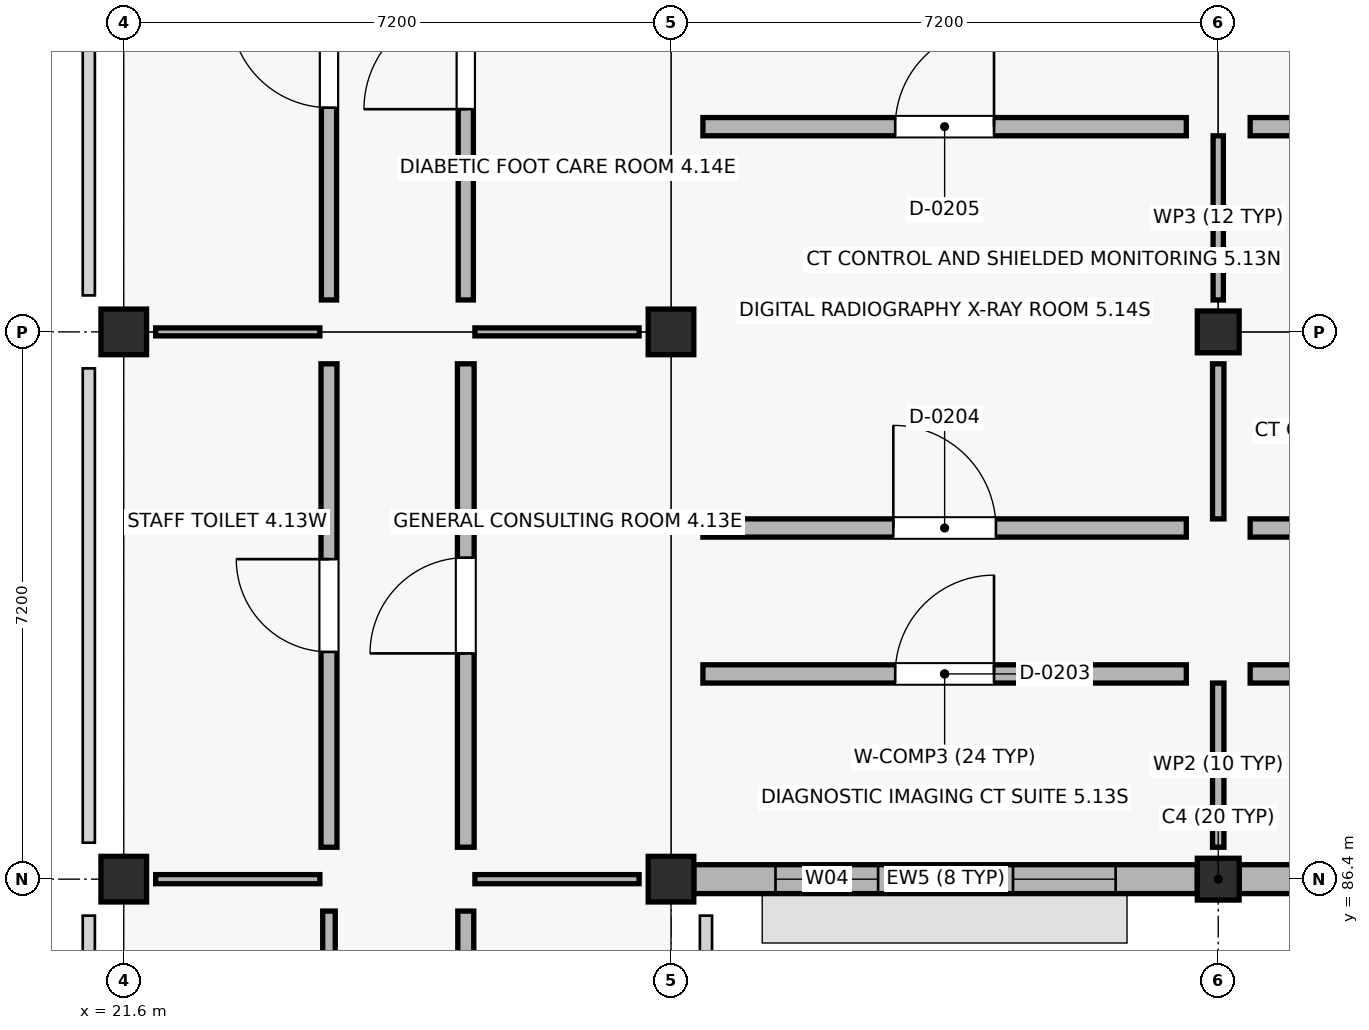
"""IFC4 building model, lengths in metres.
Left out: names, types, materials, properties, quantities, classifications, styles, units other than length and angle.
Written with IfcOpenShell. Run it as: python <this file> out.ifc"""

import sys

from ifc_helpers import new_model, si_unit, direction, frame, frame_2d, origin, origin_2d, place, context, subcontext, project, spatial, rectangle, extrude, element, fill, save


model = new_model("IFC4")
c1 = context("Model", 3, precision=1e-05, world=origin(), true_north=direction((0.0, 1.0)))
c2 = subcontext(c1, "Body", "Model", "MODEL_VIEW")
j1 = project(units=[si_unit("LENGTHUNIT", "METRE"), si_unit("PLANEANGLEUNIT", "RADIAN")], contexts=[c1])
p1 = place(None, origin())
s1 = spatial("IfcSite", under=j1, at=p1, CompositionType="ELEMENT")
p2 = place(p1, origin())
s2 = spatial("IfcBuilding", under=s1, at=p2, CompositionType="ELEMENT")
p3 = place(p2, frame((0.0, 0.0, 4.5)))
s3 = spatial("IfcBuildingStorey", under=s2, at=p3, CompositionType="ELEMENT", Elevation=4.5)
for number, where, z_axis, x_axis in (
    (1, (21.6, 86.4, 0.0), (0.0, 0.0, 1.0), (1.0, 0.0, 0.0)),
    (2, (21.6, 93.6, 0.0), (0.0, 0.0, 1.0), (1.0, 0.0, 0.0)),
    (3, (28.8, 86.4, 0.0), (0.0, 0.0, 1.0), (1.0, 0.0, 0.0)),
    (4, (28.8, 93.6, 0.0), (0.0, 0.0, 1.0), (1.0, 0.0, 0.0)),
):
    element("IfcColumn", number, at=place(p3, frame(where, z_axis=z_axis, x_axis=x_axis)), inside=s3, PredefinedType="COLUMN", context=c2, shape_type="SweptSolid", body=[
        extrude(rectangle(XDim=0.6, YDim=0.6, at=origin_2d()), origin(), (0.0, 0.0, 1.0), 4.5),
    ])
for number, where, z_axis, x_axis in (
    (5, (36.0, 86.4, 0.0), (0.0, 0.0, 1.0), (1.0, 0.0, 0.0)),
    (6, (36.0, 93.6, 0.0), (0.0, 0.0, 1.0), (1.0, 0.0, 0.0)),
):
    element("IfcColumn", number, at=place(p3, frame(where, z_axis=z_axis, x_axis=x_axis)), inside=s3, PredefinedType="COLUMN", context=c2, shape_type="SweptSolid", body=[
        extrude(rectangle(XDim=0.55, YDim=0.55, at=origin_2d()), origin(), (0.0, 0.0, 1.0), 4.5),
    ])
p4 = place(p3, frame((29.1, 86.4, 0.0), z_axis=(0.0, 0.0, 1.0), x_axis=(1.0, 0.0, 0.0)))
e7 = element("IfcWall", 7, at=p4, inside=s3, PredefinedType="SOLIDWALL", context=c2, shape_type="SweptSolid", body=[
    extrude(rectangle(XDim=6.625, YDim=0.38, at=frame_2d((3.312, 0.0))), origin(), (0.0, 0.0, 1.0), 3.47),
])
p5 = place(p4, frame((1.075, 0.0, 0.9)))
e8 = element("IfcOpeningElement", 8, at=p5, cuts=e7, PredefinedType="OPENING", context=c2, shape_type="SweptSolid", body=[
    extrude(rectangle(XDim=1.35, YDim=1.25, at=frame_2d((0.675, 0.625))), frame((0.0, 0.2, 0.0), z_axis=(0.0, -1.0, 0.0), x_axis=(1.0, 0.0, 0.0)), (0.0, 0.0, 1.0), 0.4),
])
p6 = place(p4, frame((4.2, 0.0, 0.9)))
e9 = element("IfcOpeningElement", 9, at=p6, cuts=e7, PredefinedType="OPENING", context=c2, shape_type="SweptSolid", body=[
    extrude(rectangle(XDim=1.35, YDim=1.25, at=frame_2d((0.675, 0.625))), frame((0.0, 0.2, 0.0), z_axis=(0.0, -1.0, 0.0), x_axis=(1.0, 0.0, 0.0)), (0.0, 0.0, 1.0), 0.4),
])
p7 = place(p3, frame((36.275, 86.4, 0.0), z_axis=(0.0, 0.0, 1.0), x_axis=(1.0, 0.0, 0.0)))
e10 = element("IfcWall", 10, at=p7, inside=s3, PredefinedType="SOLIDWALL", context=c2, shape_type="SweptSolid", body=[
    extrude(rectangle(XDim=6.65, YDim=0.38, at=frame_2d((3.325, 0.0))), origin(), (0.0, 0.0, 1.0), 3.47),
])
p8 = place(p7, frame((0.675, 0.0, 0.9)))
e11 = element("IfcOpeningElement", 11, at=p8, cuts=e10, PredefinedType="OPENING", context=c2, shape_type="SweptSolid", body=[
    extrude(rectangle(XDim=2.15, YDim=1.25, at=frame_2d((1.075, 0.625))), frame((0.0, 0.2, 0.0), z_axis=(0.0, -1.0, 0.0), x_axis=(1.0, 0.0, 0.0)), (0.0, 0.0, 1.0), 0.4),
])
p9 = place(p7, frame((3.825, 0.0, 0.9)))
e12 = element("IfcOpeningElement", 12, at=p9, cuts=e10, PredefinedType="OPENING", context=c2, shape_type="SweptSolid", body=[
    extrude(rectangle(XDim=2.15, YDim=1.25, at=frame_2d((1.075, 0.625))), frame((0.0, 0.2, 0.0), z_axis=(0.0, -1.0, 0.0), x_axis=(1.0, 0.0, 0.0)), (0.0, 0.0, 1.0), 0.4),
])
p10 = place(p3, frame((29.22, 89.1, 0.0), z_axis=(0.0, 0.0, 1.0), x_axis=(1.0, 0.0, 0.0)))
e13 = element("IfcWall", 13, at=p10, inside=s3, PredefinedType="SOLIDWALL", context=c2, shape_type="SweptSolid", body=[
    extrude(rectangle(XDim=6.36, YDim=0.24, at=frame_2d((3.18, 0.0))), origin(), (0.0, 0.0, 1.0), 3.36),
])
p11 = place(p10, frame((2.53, 0.0, 0.0)))
e14 = element("IfcOpeningElement", 14, at=p11, cuts=e13, PredefinedType="OPENING", context=c2, shape_type="SweptSolid", body=[
    extrude(rectangle(XDim=1.3, YDim=2.15, at=frame_2d((0.65, 1.075))), frame((0.0, 0.13, 0.0), z_axis=(0.0, -1.0, 0.0), x_axis=(1.0, 0.0, 0.0)), (0.0, 0.0, 1.0), 0.26),
])
p12 = place(p3, frame((36.0, 86.82, 0.0), z_axis=(0.0, 0.0, 1.0), x_axis=(0.0, 1.0, 0.0)))
e15 = element("IfcWall", 15, at=p12, inside=s3, PredefinedType="PARTITIONING", context=c2, shape_type="SweptSolid", body=[
    extrude(rectangle(XDim=2.16, YDim=0.15, at=frame_2d((1.08, 0.0))), origin(), (0.0, 0.0, 1.0), 3.36),
])
p13 = place(p3, frame((29.22, 91.02, 0.0), z_axis=(0.0, 0.0, 1.0), x_axis=(1.0, 0.0, 0.0)))
e16 = element("IfcWall", 16, at=p13, inside=s3, PredefinedType="SOLIDWALL", context=c2, shape_type="SweptSolid", body=[
    extrude(rectangle(XDim=6.36, YDim=0.24, at=frame_2d((3.18, 0.0))), origin(), (0.0, 0.0, 1.0), 3.36),
])
p14 = place(p13, frame((2.505, 0.0, 0.0)))
e17 = element("IfcOpeningElement", 17, at=p14, cuts=e16, PredefinedType="OPENING", context=c2, shape_type="SweptSolid", body=[
    extrude(rectangle(XDim=1.35, YDim=2.2, at=frame_2d((0.675, 1.1))), frame((0.0, 0.13, 0.0), z_axis=(0.0, -1.0, 0.0), x_axis=(1.0, 0.0, 0.0)), (0.0, 0.0, 1.0), 0.26),
])
p15 = place(p3, frame((36.0, 91.14, 0.0), z_axis=(0.0, 0.0, 1.0), x_axis=(0.0, 1.0, 0.0)))
e18 = element("IfcWall", 18, at=p15, inside=s3, PredefinedType="PARTITIONING", context=c2, shape_type="SweptSolid", body=[
    extrude(rectangle(XDim=2.04, YDim=0.15, at=frame_2d((1.02, 0.0))), origin(), (0.0, 0.0, 1.0), 3.36),
])
p16 = place(p3, frame((29.22, 96.3, 0.0), z_axis=(0.0, 0.0, 1.0), x_axis=(1.0, 0.0, 0.0)))
e19 = element("IfcWall", 19, at=p16, inside=s3, PredefinedType="SOLIDWALL", context=c2, shape_type="SweptSolid", body=[
    extrude(rectangle(XDim=6.36, YDim=0.24, at=frame_2d((3.18, 0.0))), origin(), (0.0, 0.0, 1.0), 3.36),
])
p17 = place(p16, frame((2.53, 0.0, 0.0)))
e20 = element("IfcOpeningElement", 20, at=p17, cuts=e19, PredefinedType="OPENING", context=c2, shape_type="SweptSolid", body=[
    extrude(rectangle(XDim=1.3, YDim=2.15, at=frame_2d((0.65, 1.075))), frame((0.0, 0.13, 0.0), z_axis=(0.0, -1.0, 0.0), x_axis=(1.0, 0.0, 0.0)), (0.0, 0.0, 1.0), 0.26),
])
p18 = place(p3, frame((36.0, 94.02, 0.0), z_axis=(0.0, 0.0, 1.0), x_axis=(0.0, 1.0, 0.0)))
e21 = element("IfcWall", 21, at=p18, inside=s3, PredefinedType="PARTITIONING", context=c2, shape_type="SweptSolid", body=[
    extrude(rectangle(XDim=2.16, YDim=0.135, at=frame_2d((1.08, 0.0))), origin(), (0.0, 0.0, 1.0), 3.36),
])
p19 = place(p3, frame((36.42, 89.1, 0.0), z_axis=(0.0, 0.0, 1.0), x_axis=(1.0, 0.0, 0.0)))
e22 = element("IfcWall", 22, at=p19, inside=s3, PredefinedType="SOLIDWALL", context=c2, shape_type="SweptSolid", body=[
    extrude(rectangle(XDim=6.36, YDim=0.24, at=frame_2d((3.18, 0.0))), origin(), (0.0, 0.0, 1.0), 3.36),
])
p20 = place(p19, frame((2.53, 0.0, 0.0)))
e23 = element("IfcOpeningElement", 23, at=p20, cuts=e22, PredefinedType="OPENING", context=c2, shape_type="SweptSolid", body=[
    extrude(rectangle(XDim=1.3, YDim=2.15, at=frame_2d((0.65, 1.075))), frame((0.0, 0.13, 0.0), z_axis=(0.0, -1.0, 0.0), x_axis=(1.0, 0.0, 0.0)), (0.0, 0.0, 1.0), 0.26),
])
p21 = place(p3, frame((36.42, 91.02, 0.0), z_axis=(0.0, 0.0, 1.0), x_axis=(1.0, 0.0, 0.0)))
e24 = element("IfcWall", 24, at=p21, inside=s3, PredefinedType="SOLIDWALL", context=c2, shape_type="SweptSolid", body=[
    extrude(rectangle(XDim=6.36, YDim=0.24, at=frame_2d((3.18, 0.0))), origin(), (0.0, 0.0, 1.0), 3.36),
])
p22 = place(p21, frame((2.505, 0.0, 0.0)))
e25 = element("IfcOpeningElement", 25, at=p22, cuts=e24, PredefinedType="OPENING", context=c2, shape_type="SweptSolid", body=[
    extrude(rectangle(XDim=1.35, YDim=2.2, at=frame_2d((0.675, 1.1))), frame((0.0, 0.13, 0.0), z_axis=(0.0, -1.0, 0.0), x_axis=(1.0, 0.0, 0.0)), (0.0, 0.0, 1.0), 0.26),
])
p23 = place(p3, frame((36.42, 96.3, 0.0), z_axis=(0.0, 0.0, 1.0), x_axis=(1.0, 0.0, 0.0)))
e26 = element("IfcWall", 26, at=p23, inside=s3, PredefinedType="SOLIDWALL", context=c2, shape_type="SweptSolid", body=[
    extrude(rectangle(XDim=6.36, YDim=0.24, at=frame_2d((3.18, 0.0))), origin(), (0.0, 0.0, 1.0), 3.36),
])
p24 = place(p23, frame((2.53, 0.0, 0.0)))
e27 = element("IfcOpeningElement", 27, at=p24, cuts=e26, PredefinedType="OPENING", context=c2, shape_type="SweptSolid", body=[
    extrude(rectangle(XDim=1.3, YDim=2.15, at=frame_2d((0.65, 1.075))), frame((0.0, 0.13, 0.0), z_axis=(0.0, -1.0, 0.0), x_axis=(1.0, 0.0, 0.0)), (0.0, 0.0, 1.0), 0.26),
])
p25 = place(p3, frame((24.3, 79.62, 0.0), z_axis=(0.0, 0.0, 1.0), x_axis=(0.0, 1.0, 0.0)))
e28 = element("IfcWall", 28, at=p25, inside=s3, PredefinedType="PARTITIONING", context=c2, shape_type="SweptSolid", body=[
    extrude(rectangle(XDim=6.36, YDim=0.165, at=frame_2d((3.18, 0.0))), origin(), (0.0, 0.0, 1.0), 3.36),
])
p26 = place(p25, frame((2.61, 0.0, 0.0)))
e29 = element("IfcOpeningElement", 29, at=p26, cuts=e28, PredefinedType="OPENING", context=c2, shape_type="SweptSolid", body=[
    extrude(rectangle(XDim=1.14, YDim=2.04, at=frame_2d((0.57, 1.02))), frame((0.0, 0.093, 0.0), z_axis=(0.0, -1.0, 0.0), x_axis=(1.0, 0.0, 0.0)), (0.0, 0.0, 1.0), 0.185),
])
p27 = place(p3, frame((22.02, 86.4, 0.0), z_axis=(0.0, 0.0, 1.0), x_axis=(1.0, 0.0, 0.0)))
e30 = element("IfcWall", 30, at=p27, inside=s3, PredefinedType="PARTITIONING", context=c2, shape_type="SweptSolid", body=[
    extrude(rectangle(XDim=2.16, YDim=0.12, at=frame_2d((1.08, 0.0))), origin(), (0.0, 0.0, 1.0), 3.36),
])
p28 = place(p3, frame((26.1, 79.62, 0.0), z_axis=(0.0, 0.0, 1.0), x_axis=(0.0, 1.0, 0.0)))
e31 = element("IfcWall", 31, at=p28, inside=s3, PredefinedType="PLUMBINGWALL", context=c2, shape_type="SweptSolid", body=[
    extrude(rectangle(XDim=6.36, YDim=0.21, at=frame_2d((3.18, 0.0))), origin(), (0.0, 0.0, 1.0), 3.36),
])
p29 = place(p28, frame((2.59, 0.0, 0.0)))
e32 = element("IfcOpeningElement", 32, at=p29, cuts=e31, PredefinedType="OPENING", context=c2, shape_type="SweptSolid", body=[
    extrude(rectangle(XDim=1.18, YDim=2.04, at=frame_2d((0.59, 1.02))), frame((0.0, 0.115, 0.0), z_axis=(0.0, -1.0, 0.0), x_axis=(1.0, 0.0, 0.0)), (0.0, 0.0, 1.0), 0.23),
])
p30 = place(p3, frame((26.22, 86.4, 0.0), z_axis=(0.0, 0.0, 1.0), x_axis=(1.0, 0.0, 0.0)))
e33 = element("IfcWall", 33, at=p30, inside=s3, PredefinedType="PARTITIONING", context=c2, shape_type="SweptSolid", body=[
    extrude(rectangle(XDim=2.16, YDim=0.12, at=frame_2d((1.08, 0.0))), origin(), (0.0, 0.0, 1.0), 3.36),
])
p31 = place(p3, frame((24.3, 86.82, 0.0), z_axis=(0.0, 0.0, 1.0), x_axis=(0.0, 1.0, 0.0)))
e34 = element("IfcWall", 34, at=p31, inside=s3, PredefinedType="PLUMBINGWALL", context=c2, shape_type="SweptSolid", body=[
    extrude(rectangle(XDim=6.36, YDim=0.21, at=frame_2d((3.18, 0.0))), origin(), (0.0, 0.0, 1.0), 3.36),
])
p32 = place(p31, frame((2.57, 0.0, 0.0)))
e35 = element("IfcOpeningElement", 35, at=p32, cuts=e34, PredefinedType="OPENING", context=c2, shape_type="SweptSolid", body=[
    extrude(rectangle(XDim=1.22, YDim=2.04, at=frame_2d((0.61, 1.02))), frame((0.0, 0.115, 0.0), z_axis=(0.0, -1.0, 0.0), x_axis=(1.0, 0.0, 0.0)), (0.0, 0.0, 1.0), 0.23),
])
p33 = place(p3, frame((22.02, 93.6, 0.0), z_axis=(0.0, 0.0, 1.0), x_axis=(1.0, 0.0, 0.0)))
e36 = element("IfcWall", 36, at=p33, inside=s3, PredefinedType="PARTITIONING", context=c2, shape_type="SweptSolid", body=[
    extrude(rectangle(XDim=2.16, YDim=0.105, at=frame_2d((1.08, 0.0))), origin(), (0.0, 0.0, 1.0), 3.36),
])
p34 = place(p3, frame((26.1, 86.82, 0.0), z_axis=(0.0, 0.0, 1.0), x_axis=(0.0, 1.0, 0.0)))
e37 = element("IfcWall", 37, at=p34, inside=s3, PredefinedType="SOLIDWALL", context=c2, shape_type="SweptSolid", body=[
    extrude(rectangle(XDim=6.36, YDim=0.22, at=frame_2d((3.18, 0.0))), origin(), (0.0, 0.0, 1.0), 3.36),
])
p35 = place(p34, frame((2.55, 0.0, 0.0)))
e38 = element("IfcOpeningElement", 38, at=p35, cuts=e37, PredefinedType="OPENING", context=c2, shape_type="SweptSolid", body=[
    extrude(rectangle(XDim=1.26, YDim=2.04, at=frame_2d((0.63, 1.02))), frame((0.0, 0.12, 0.0), z_axis=(0.0, -1.0, 0.0), x_axis=(1.0, 0.0, 0.0)), (0.0, 0.0, 1.0), 0.24),
])
p36 = place(p3, frame((26.22, 93.6, 0.0), z_axis=(0.0, 0.0, 1.0), x_axis=(1.0, 0.0, 0.0)))
e39 = element("IfcWall", 39, at=p36, inside=s3, PredefinedType="PARTITIONING", context=c2, shape_type="SweptSolid", body=[
    extrude(rectangle(XDim=2.16, YDim=0.105, at=frame_2d((1.08, 0.0))), origin(), (0.0, 0.0, 1.0), 3.36),
])
p37 = place(p3, frame((24.3, 94.02, 0.0), z_axis=(0.0, 0.0, 1.0), x_axis=(0.0, 1.0, 0.0)))
e40 = element("IfcWall", 40, at=p37, inside=s3, PredefinedType="SOLIDWALL", context=c2, shape_type="SweptSolid", body=[
    extrude(rectangle(XDim=6.36, YDim=0.2, at=frame_2d((3.18, 0.0))), origin(), (0.0, 0.0, 1.0), 3.36),
])
p38 = place(p37, frame((2.53, 0.0, 0.0)))
e41 = element("IfcOpeningElement", 41, at=p38, cuts=e40, PredefinedType="OPENING", context=c2, shape_type="SweptSolid", body=[
    extrude(rectangle(XDim=1.3, YDim=2.04, at=frame_2d((0.65, 1.02))), frame((0.0, 0.11, 0.0), z_axis=(0.0, -1.0, 0.0), x_axis=(1.0, 0.0, 0.0)), (0.0, 0.0, 1.0), 0.22),
])
p39 = place(p3, frame((26.1, 94.02, 0.0), z_axis=(0.0, 0.0, 1.0), x_axis=(0.0, 1.0, 0.0)))
e42 = element("IfcWall", 42, at=p39, inside=s3, PredefinedType="SOLIDWALL", context=c2, shape_type="SweptSolid", body=[
    extrude(rectangle(XDim=6.36, YDim=0.2, at=frame_2d((3.18, 0.0))), origin(), (0.0, 0.0, 1.0), 3.36),
])
p40 = place(p39, frame((2.51, 0.0, 0.0)))
e43 = element("IfcOpeningElement", 43, at=p40, cuts=e42, PredefinedType="OPENING", context=c2, shape_type="SweptSolid", body=[
    extrude(rectangle(XDim=1.34, YDim=2.04, at=frame_2d((0.67, 1.02))), frame((0.0, 0.11, 0.0), z_axis=(0.0, -1.0, 0.0), x_axis=(1.0, 0.0, 0.0)), (0.0, 0.0, 1.0), 0.22),
])
p41 = place(p5, origin())
e44 = element("IfcWindow", 44, at=p41, inside=s3, PartitioningType="SINGLE_PANEL", PredefinedType="WINDOW", context=c2, shape_type="SweptSolid", body=[
    extrude(rectangle(XDim=1.35, YDim=1.25, at=frame_2d((0.675, 0.625))), frame((0.0, 0.03, 0.0), z_axis=(0.0, -1.0, 0.0), x_axis=(1.0, 0.0, 0.0)), (0.0, 0.0, 1.0), 0.06),
])
fill(e8, e44)
p42 = place(p6, origin())
e45 = element("IfcWindow", 45, at=p42, inside=s3, PartitioningType="SINGLE_PANEL", PredefinedType="WINDOW", context=c2, shape_type="SweptSolid", body=[
    extrude(rectangle(XDim=1.35, YDim=1.25, at=frame_2d((0.675, 0.625))), frame((0.0, 0.03, 0.0), z_axis=(0.0, -1.0, 0.0), x_axis=(1.0, 0.0, 0.0)), (0.0, 0.0, 1.0), 0.06),
])
fill(e9, e45)
p43 = place(p11, origin())
e46 = element("IfcDoor", 46, at=p43, inside=s3, OperationType="SINGLE_SWING_RIGHT", PredefinedType="DOOR", context=c2, shape_type="SweptSolid", body=[
    extrude(rectangle(XDim=1.3, YDim=2.15, at=frame_2d((0.65, 1.075))), frame((0.0, 0.025, 0.0), z_axis=(0.0, -1.0, 0.0), x_axis=(1.0, 0.0, 0.0)), (0.0, 0.0, 1.0), 0.05),
])
fill(e14, e46)
p44 = place(p14, origin())
e47 = element("IfcDoor", 47, at=p44, inside=s3, OperationType="SINGLE_SWING_LEFT", PredefinedType="DOOR", context=c2, shape_type="SweptSolid", body=[
    extrude(rectangle(XDim=1.35, YDim=2.2, at=frame_2d((0.675, 1.1))), frame((0.0, 0.025, 0.0), z_axis=(0.0, -1.0, 0.0), x_axis=(1.0, 0.0, 0.0)), (0.0, 0.0, 1.0), 0.05),
])
fill(e17, e47)
p45 = place(p17, origin())
e48 = element("IfcDoor", 48, at=p45, inside=s3, OperationType="SINGLE_SWING_RIGHT", PredefinedType="DOOR", context=c2, shape_type="SweptSolid", body=[
    extrude(rectangle(XDim=1.3, YDim=2.15, at=frame_2d((0.65, 1.075))), frame((0.0, 0.025, 0.0), z_axis=(0.0, -1.0, 0.0), x_axis=(1.0, 0.0, 0.0)), (0.0, 0.0, 1.0), 0.05),
])
fill(e20, e48)
p46 = place(p32, origin())
e49 = element("IfcDoor", 49, at=p46, inside=s3, OperationType="SINGLE_SWING_RIGHT", PredefinedType="DOOR", context=c2, shape_type="SweptSolid", body=[
    extrude(rectangle(XDim=1.22, YDim=2.04, at=frame_2d((0.61, 1.02))), frame((0.0, 0.025, 0.0), z_axis=(0.0, -1.0, 0.0), x_axis=(1.0, 0.0, 0.0)), (0.0, 0.0, 1.0), 0.05),
])
fill(e35, e49)
p47 = place(p35, origin())
e50 = element("IfcDoor", 50, at=p47, inside=s3, OperationType="SINGLE_SWING_LEFT", PredefinedType="DOOR", context=c2, shape_type="SweptSolid", body=[
    extrude(rectangle(XDim=1.26, YDim=2.04, at=frame_2d((0.63, 1.02))), frame((0.0, 0.025, 0.0), z_axis=(0.0, -1.0, 0.0), x_axis=(1.0, 0.0, 0.0)), (0.0, 0.0, 1.0), 0.05),
])
fill(e38, e50)
p48 = place(p38, origin())
e51 = element("IfcDoor", 51, at=p48, inside=s3, OperationType="SINGLE_SWING_RIGHT", PredefinedType="DOOR", context=c2, shape_type="SweptSolid", body=[
    extrude(rectangle(XDim=1.3, YDim=2.04, at=frame_2d((0.65, 1.02))), frame((0.0, 0.025, 0.0), z_axis=(0.0, -1.0, 0.0), x_axis=(1.0, 0.0, 0.0)), (0.0, 0.0, 1.0), 0.05),
])
fill(e41, e51)
p49 = place(p40, origin())
e52 = element("IfcDoor", 52, at=p49, inside=s3, OperationType="SINGLE_SWING_LEFT", PredefinedType="DOOR", context=c2, shape_type="SweptSolid", body=[
    extrude(rectangle(XDim=1.34, YDim=2.04, at=frame_2d((0.67, 1.02))), frame((0.0, 0.025, 0.0), z_axis=(0.0, -1.0, 0.0), x_axis=(1.0, 0.0, 0.0)), (0.0, 0.0, 1.0), 0.05),
])
fill(e43, e52)
save(model, sys.argv[1])
